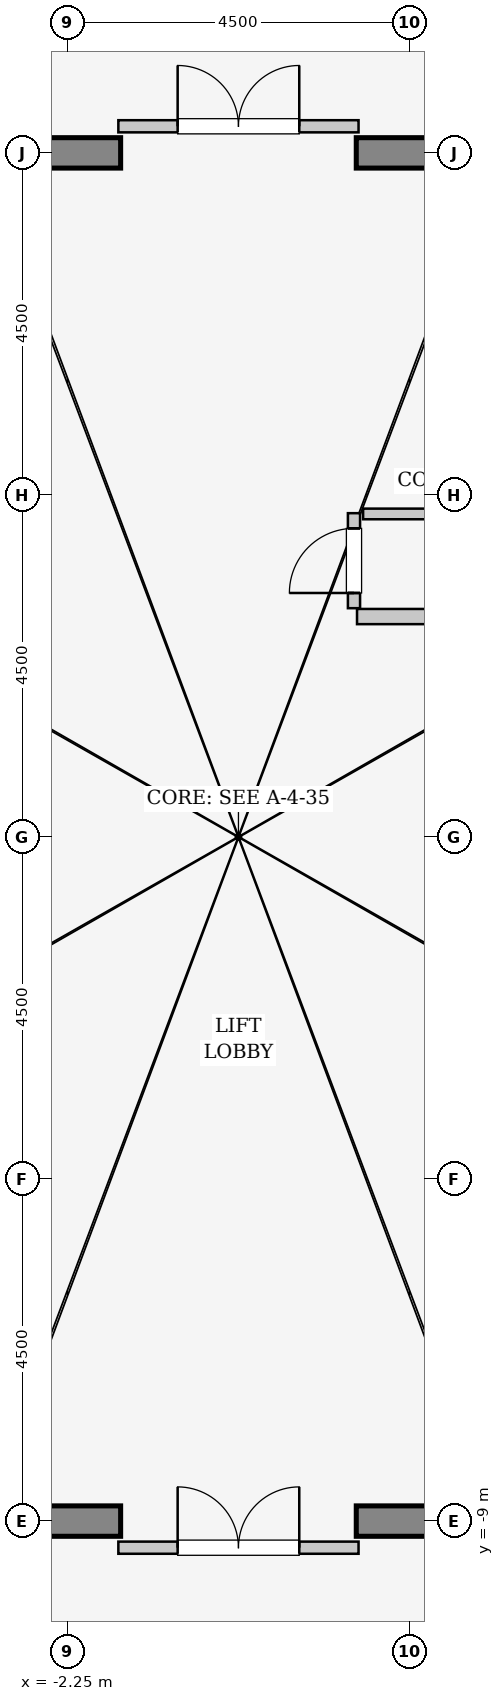
"""IFC4 building model, lengths in metres.
Left out: names, types, materials, properties, quantities, classifications, styles, units other than length and angle.
Written with IfcOpenShell. Run it as: python <this file> out.ifc"""

import sys

from ifc_helpers import new_model, si_unit, direction, frame, frame_2d, origin, place, context, subcontext, project, spatial, rectangle, extrude, source, transform, mapped, element, fill, save


model = new_model("IFC4")
c1 = context("Model", 3, precision=1e-05, world=origin(), true_north=direction((0.0, 1.0)))
c2 = subcontext(c1, "Body", "Model", "MODEL_VIEW")
j1 = project(units=[si_unit("LENGTHUNIT", "METRE"), si_unit("PLANEANGLEUNIT", "RADIAN")], contexts=[c1])
p1 = place(None, origin())
s1 = spatial("IfcSite", under=j1, at=p1, CompositionType="ELEMENT")
p2 = place(p1, origin())
s2 = spatial("IfcBuilding", under=s1, at=p2, CompositionType="ELEMENT")
p3 = place(p2, frame((0.0, 0.0, 367.4)))
s3 = spatial("IfcBuildingStorey", under=s2, at=p3, CompositionType="ELEMENT", Elevation=367.4)
m1 = source(origin(), c2, "Body", "SweptSolid", [
    extrude(rectangle(XDim=9.9, YDim=0.4, at=frame_2d((4.95, 0.0))), origin(), (0.0, 0.0, 1.0), 4.4),
])
for number, where, z_axis, x_axis in (
    (1, (-11.45, 9.0, 0.0), (0.0, 0.0, 1.0), (1.0, 0.0, 0.0)),
    (2, (1.55, 9.0, 0.0), (0.0, 0.0, 1.0), (1.0, 0.0, 0.0)),
    (3, (-11.45, -9.0, 0.0), (0.0, 0.0, 1.0), (1.0, 0.0, 0.0)),
    (4, (1.55, -9.0, 0.0), (0.0, 0.0, 1.0), (1.0, 0.0, 0.0)),
):
    element("IfcWall", number, at=place(p3, frame(where, z_axis=z_axis, x_axis=x_axis)), inside=s3, PredefinedType="SHEAR", context=c2, shape_type="MappedRepresentation", body=[
        mapped(m1, transform((0.0, 0.0, 0.0), x_axis=(1.0, 0.0, 0.0), y_axis=(0.0, 1.0, 0.0), z_axis=(0.0, 0.0, 1.0), scale=1.0)),
    ])
m2 = source(origin(), c2, "Body", "SweptSolid", [
    extrude(rectangle(XDim=2.52, YDim=0.2, at=frame_2d((1.26, 0.0))), origin(), (0.0, 0.0, 1.0), 4.085),
])
p4 = place(p3, frame((1.56, 2.9, 0.0), z_axis=(0.0, 0.0, 1.0), x_axis=(1.0, 0.0, 0.0)))
e5 = element("IfcWall", 5, at=p4, inside=s3, PredefinedType="PARTITIONING", context=c2, shape_type="MappedRepresentation", body=[
    mapped(m2, transform((0.0, 0.0, 0.0), x_axis=(1.0, 0.0, 0.0), y_axis=(0.0, 1.0, 0.0), z_axis=(0.0, 0.0, 1.0), scale=1.0)),
])
m3 = source(origin(), c2, "Body", "SweptSolid", [
    extrude(rectangle(XDim=3.16, YDim=0.16, at=frame_2d((1.58, 0.0))), origin(), (0.0, 0.0, 1.0), 3.175),
])
p5 = place(p3, frame((-1.58, 9.35, 0.0), z_axis=(0.0, 0.0, 1.0), x_axis=(1.0, 0.0, 0.0)))
e6 = element("IfcWall", 6, at=p5, inside=s3, PredefinedType="PARTITIONING", context=c2, shape_type="MappedRepresentation", body=[
    mapped(m3, transform((0.0, 0.0, 0.0), x_axis=(1.0, 0.0, 0.0), y_axis=(0.0, 1.0, 0.0), z_axis=(0.0, 0.0, 1.0), scale=1.0)),
])
p6 = place(p5, frame((0.78, 0.0, 0.0)))
e7 = element("IfcOpeningElement", 7, at=p6, cuts=e6, PredefinedType="OPENING", context=c2, shape_type="SweptSolid", body=[
    extrude(rectangle(XDim=1.6, YDim=2.3, at=frame_2d((0.8, 1.15))), frame((0.0, 0.09, 0.0), z_axis=(0.0, -1.0, 0.0), x_axis=(1.0, 0.0, 0.0)), (0.0, 0.0, 1.0), 0.18),
])
p7 = place(p3, frame((-1.58, -9.35, 0.0), z_axis=(0.0, 0.0, 1.0), x_axis=(1.0, 0.0, 0.0)))
e8 = element("IfcWall", 8, at=p7, inside=s3, PredefinedType="PARTITIONING", context=c2, shape_type="MappedRepresentation", body=[
    mapped(m3, transform((0.0, 0.0, 0.0), x_axis=(1.0, 0.0, 0.0), y_axis=(0.0, 1.0, 0.0), z_axis=(0.0, 0.0, 1.0), scale=1.0)),
])
p8 = place(p7, frame((0.78, 0.0, 0.0)))
e9 = element("IfcOpeningElement", 9, at=p8, cuts=e8, PredefinedType="OPENING", context=c2, shape_type="SweptSolid", body=[
    extrude(rectangle(XDim=1.6, YDim=2.3, at=frame_2d((0.8, 1.15))), frame((0.0, 0.09, 0.0), z_axis=(0.0, -1.0, 0.0), x_axis=(1.0, 0.0, 0.0)), (0.0, 0.0, 1.0), 0.18),
])
m4 = source(origin(), c2, "Body", "SweptSolid", [
    extrude(rectangle(XDim=1.25, YDim=0.16, at=frame_2d((0.625, 0.0))), origin(), (0.0, 0.0, 1.0), 4.085),
])
p9 = place(p3, frame((1.52, 3.01, 0.0), z_axis=(0.0, 0.0, 1.0), x_axis=(0.0, 1.0, 0.0)))
e10 = element("IfcWall", 10, at=p9, inside=s3, PredefinedType="PARTITIONING", context=c2, shape_type="MappedRepresentation", body=[
    mapped(m4, transform((0.0, 0.0, 0.0), x_axis=(1.0, 0.0, 0.0), y_axis=(0.0, 1.0, 0.0), z_axis=(0.0, 0.0, 1.0), scale=1.0)),
])
p10 = place(p9, frame((0.2, 0.0, 0.0)))
e11 = element("IfcOpeningElement", 11, at=p10, cuts=e10, PredefinedType="OPENING", context=c2, shape_type="SweptSolid", body=[
    extrude(rectangle(XDim=0.85, YDim=2.1, at=frame_2d((0.425, 1.05))), frame((0.0, 0.09, 0.0), z_axis=(0.0, -1.0, 0.0), x_axis=(1.0, 0.0, 0.0)), (0.0, 0.0, 1.0), 0.18),
])
m5 = source(origin(), c2, "Body", "SweptSolid", [
    extrude(rectangle(XDim=3.15, YDim=0.14, at=frame_2d((1.575, 0.0))), origin(), (0.0, 0.0, 1.0), 4.085),
])
p11 = place(p3, frame((1.64, 4.25, 0.0), z_axis=(0.0, 0.0, 1.0), x_axis=(1.0, 0.0, 0.0)))
e12 = element("IfcWall", 12, at=p11, inside=s3, PredefinedType="PARTITIONING", context=c2, shape_type="MappedRepresentation", body=[
    mapped(m5, transform((0.0, 0.0, 0.0), x_axis=(1.0, 0.0, 0.0), y_axis=(0.0, 1.0, 0.0), z_axis=(0.0, 0.0, 1.0), scale=1.0)),
])
m6 = source(origin(), c2, "Body", "SweptSolid", [
    extrude(rectangle(XDim=1.6, YDim=2.3, at=frame_2d((0.8, 1.15))), frame((0.0, 0.025, 0.0), z_axis=(0.0, -1.0, 0.0), x_axis=(1.0, 0.0, 0.0)), (0.0, 0.0, 1.0), 0.05),
])
p12 = place(p6, origin())
e13 = element("IfcDoor", 13, at=p12, inside=s3, OperationType="DOUBLE_DOOR_SINGLE_SWING", PredefinedType="DOOR", context=c2, shape_type="MappedRepresentation", body=[
    mapped(m6, transform((0.0, 0.0, 0.0), x_axis=(1.0, 0.0, 0.0), y_axis=(0.0, 1.0, 0.0), z_axis=(0.0, 0.0, 1.0), scale=1.0)),
])
fill(e7, e13)
p13 = place(p8, origin())
e14 = element("IfcDoor", 14, at=p13, inside=s3, OperationType="DOUBLE_DOOR_SINGLE_SWING", PredefinedType="DOOR", context=c2, shape_type="MappedRepresentation", body=[
    mapped(m6, transform((0.0, 0.0, 0.0), x_axis=(1.0, 0.0, 0.0), y_axis=(0.0, 1.0, 0.0), z_axis=(0.0, 0.0, 1.0), scale=1.0)),
])
fill(e9, e14)
m7 = source(origin(), c2, "Body", "SweptSolid", [
    extrude(rectangle(XDim=0.85, YDim=2.1, at=frame_2d((0.425, 1.05))), frame((0.0, 0.025, 0.0), z_axis=(0.0, -1.0, 0.0), x_axis=(1.0, 0.0, 0.0)), (0.0, 0.0, 1.0), 0.05),
])
p14 = place(p10, origin())
e15 = element("IfcDoor", 15, at=p14, inside=s3, OperationType="SINGLE_SWING_LEFT", PredefinedType="DOOR", context=c2, shape_type="MappedRepresentation", body=[
    mapped(m7, transform((0.0, 0.0, 0.0), x_axis=(1.0, 0.0, 0.0), y_axis=(0.0, 1.0, 0.0), z_axis=(0.0, 0.0, 1.0), scale=1.0)),
])
fill(e11, e15)
save(model, sys.argv[1])
